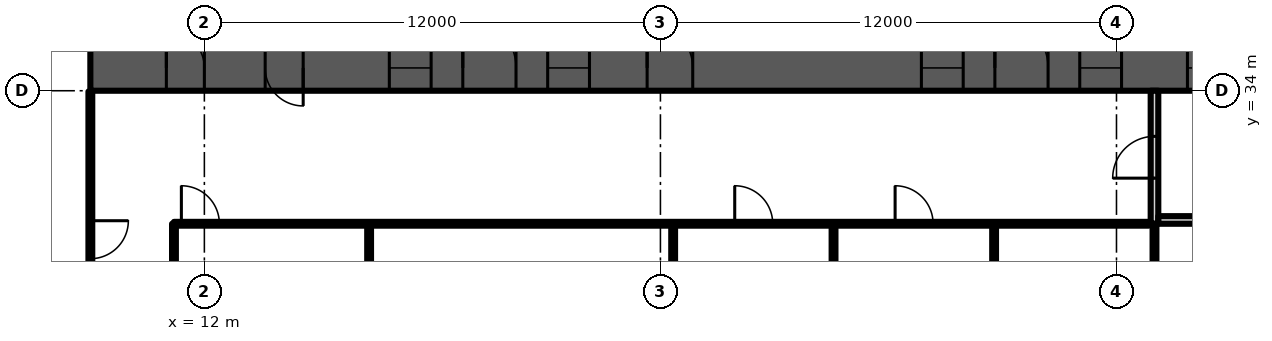
"""IFC4 building model, lengths in metres.
Left out: names, types, materials, properties, quantities, classifications, styles, units other than length and angle.
Written with IfcOpenShell. Run it as: python <this file> out.ifc"""

import sys

from ifc_helpers import new_model, si_unit, direction, frame, frame_2d, origin, place, context, subcontext, project, spatial, rectangle, extrude, element, fill, save


model = new_model("IFC4")
c1 = context("Model", 3, precision=1e-05, world=origin(), true_north=direction((0.0, 1.0)))
c2 = subcontext(c1, "Body", "Model", "MODEL_VIEW")
j1 = project(units=[si_unit("LENGTHUNIT", "METRE"), si_unit("PLANEANGLEUNIT", "RADIAN")], contexts=[c1])
p1 = place(None, origin())
s1 = spatial("IfcSite", under=j1, at=p1, CompositionType="ELEMENT")
p2 = place(p1, origin())
s2 = spatial("IfcBuilding", under=s1, at=p2, CompositionType="ELEMENT")
p3 = place(p2, frame((0.0, 0.0, 52.3)))
s3 = spatial("IfcBuildingStorey", under=s2, at=p3, CompositionType="ELEMENT", Elevation=52.3)
p4 = place(p3, frame((9.0, 34.6, 0.0), z_axis=(0.0, 0.0, 1.0), x_axis=(1.0, 0.0, 0.0)))
e1 = element("IfcWall", 1, at=p4, inside=s3, PredefinedType="SHEAR", context=c2, shape_type="SweptSolid", body=[
    extrude(rectangle(XDim=56.0, YDim=1.2, at=frame_2d((28.0, 0.0))), origin(), (0.0, 0.0, 1.0), 3.6),
])
p5 = place(p4, frame((2.0, 0.0, 0.0)))
e2 = element("IfcOpeningElement", 2, at=p5, cuts=e1, PredefinedType="OPENING", context=c2, shape_type="SweptSolid", body=[
    extrude(rectangle(XDim=1.0, YDim=2.1, at=frame_2d((0.5, 1.05))), frame((0.0, 0.61, 0.0), z_axis=(0.0, -1.0, 0.0), x_axis=(1.0, 0.0, 0.0)), (0.0, 0.0, 1.0), 1.22),
])
p6 = place(p4, frame((4.6, 0.0, 0.0)))
e3 = element("IfcOpeningElement", 3, at=p6, cuts=e1, PredefinedType="OPENING", context=c2, shape_type="SweptSolid", body=[
    extrude(rectangle(XDim=1.0, YDim=2.1, at=frame_2d((0.5, 1.05))), frame((0.0, 0.61, 0.0), z_axis=(0.0, -1.0, 0.0), x_axis=(1.0, 0.0, 0.0)), (0.0, 0.0, 1.0), 1.22),
])
p7 = place(p4, frame((7.867, 0.0, 0.0)))
e4 = element("IfcOpeningElement", 4, at=p7, cuts=e1, PredefinedType="OPENING", context=c2, shape_type="SweptSolid", body=[
    extrude(rectangle(XDim=1.1, YDim=2.1, at=frame_2d((0.55, 1.05))), frame((0.0, 0.61, 0.0), z_axis=(0.0, -1.0, 0.0), x_axis=(1.0, 0.0, 0.0)), (0.0, 0.0, 1.0), 1.22),
])
p8 = place(p4, frame((12.033, 0.0, 0.0)))
e5 = element("IfcOpeningElement", 5, at=p8, cuts=e1, PredefinedType="OPENING", context=c2, shape_type="SweptSolid", body=[
    extrude(rectangle(XDim=1.1, YDim=2.1, at=frame_2d((0.55, 1.05))), frame((0.0, 0.61, 0.0), z_axis=(0.0, -1.0, 0.0), x_axis=(1.0, 0.0, 0.0)), (0.0, 0.0, 1.0), 1.22),
])
p9 = place(p4, frame((9.8, 0.0, 0.0)))
e6 = element("IfcOpeningElement", 6, at=p9, cuts=e1, PredefinedType="OPENING", context=c2, shape_type="SweptSolid", body=[
    extrude(rectangle(XDim=1.4, YDim=2.1, at=frame_2d((0.7, 1.05))), frame((0.0, 0.61, 0.0), z_axis=(0.0, -1.0, 0.0), x_axis=(1.0, 0.0, 0.0)), (0.0, 0.0, 1.0), 1.22),
])
p10 = place(p4, frame((14.65, 0.0, 0.0)))
e7 = element("IfcOpeningElement", 7, at=p10, cuts=e1, PredefinedType="OPENING", context=c2, shape_type="SweptSolid", body=[
    extrude(rectangle(XDim=1.2, YDim=2.1, at=frame_2d((0.6, 1.05))), frame((0.0, 0.61, 0.0), z_axis=(0.0, -1.0, 0.0), x_axis=(1.0, 0.0, 0.0)), (0.0, 0.0, 1.0), 1.22),
])
p11 = place(p4, frame((21.867, 0.0, 0.0)))
e8 = element("IfcOpeningElement", 8, at=p11, cuts=e1, PredefinedType="OPENING", context=c2, shape_type="SweptSolid", body=[
    extrude(rectangle(XDim=1.1, YDim=2.1, at=frame_2d((0.55, 1.05))), frame((0.0, 0.61, 0.0), z_axis=(0.0, -1.0, 0.0), x_axis=(1.0, 0.0, 0.0)), (0.0, 0.0, 1.0), 1.22),
])
p12 = place(p4, frame((26.033, 0.0, 0.0)))
e9 = element("IfcOpeningElement", 9, at=p12, cuts=e1, PredefinedType="OPENING", context=c2, shape_type="SweptSolid", body=[
    extrude(rectangle(XDim=1.1, YDim=2.1, at=frame_2d((0.55, 1.05))), frame((0.0, 0.61, 0.0), z_axis=(0.0, -1.0, 0.0), x_axis=(1.0, 0.0, 0.0)), (0.0, 0.0, 1.0), 1.22),
])
p13 = place(p4, frame((23.8, 0.0, 0.0)))
e10 = element("IfcOpeningElement", 10, at=p13, cuts=e1, PredefinedType="OPENING", context=c2, shape_type="SweptSolid", body=[
    extrude(rectangle(XDim=1.4, YDim=2.1, at=frame_2d((0.7, 1.05))), frame((0.0, 0.61, 0.0), z_axis=(0.0, -1.0, 0.0), x_axis=(1.0, 0.0, 0.0)), (0.0, 0.0, 1.0), 1.22),
])
p14 = place(p4, frame((28.867, 0.0, 0.0)))
e11 = element("IfcOpeningElement", 11, at=p14, cuts=e1, PredefinedType="OPENING", context=c2, shape_type="SweptSolid", body=[
    extrude(rectangle(XDim=1.1, YDim=2.1, at=frame_2d((0.55, 1.05))), frame((0.0, 0.61, 0.0), z_axis=(0.0, -1.0, 0.0), x_axis=(1.0, 0.0, 0.0)), (0.0, 0.0, 1.0), 1.22),
])
p15 = place(p4, frame((33.033, 0.0, 0.0)))
e12 = element("IfcOpeningElement", 12, at=p15, cuts=e1, PredefinedType="OPENING", context=c2, shape_type="SweptSolid", body=[
    extrude(rectangle(XDim=1.1, YDim=2.1, at=frame_2d((0.55, 1.05))), frame((0.0, 0.61, 0.0), z_axis=(0.0, -1.0, 0.0), x_axis=(1.0, 0.0, 0.0)), (0.0, 0.0, 1.0), 1.22),
])
p16 = place(p4, frame((40.15, 0.0, 0.0)))
e13 = element("IfcOpeningElement", 13, at=p16, cuts=e1, PredefinedType="OPENING", context=c2, shape_type="SweptSolid", body=[
    extrude(rectangle(XDim=1.2, YDim=2.1, at=frame_2d((0.6, 1.05))), frame((0.0, 0.61, 0.0), z_axis=(0.0, -1.0, 0.0), x_axis=(1.0, 0.0, 0.0)), (0.0, 0.0, 1.0), 1.22),
])
p17 = place(p4, frame((44.8, 0.0, 0.0)))
e14 = element("IfcOpeningElement", 14, at=p17, cuts=e1, PredefinedType="OPENING", context=c2, shape_type="SweptSolid", body=[
    extrude(rectangle(XDim=1.4, YDim=2.1, at=frame_2d((0.7, 1.05))), frame((0.0, 0.61, 0.0), z_axis=(0.0, -1.0, 0.0), x_axis=(1.0, 0.0, 0.0)), (0.0, 0.0, 1.0), 1.22),
])
p18 = place(p4, frame((49.867, 0.0, 0.0)))
e15 = element("IfcOpeningElement", 15, at=p18, cuts=e1, PredefinedType="OPENING", context=c2, shape_type="SweptSolid", body=[
    extrude(rectangle(XDim=1.1, YDim=2.1, at=frame_2d((0.55, 1.05))), frame((0.0, 0.61, 0.0), z_axis=(0.0, -1.0, 0.0), x_axis=(1.0, 0.0, 0.0)), (0.0, 0.0, 1.0), 1.22),
])
p19 = place(p4, frame((53.5, 0.0, 0.0)))
e16 = element("IfcOpeningElement", 16, at=p19, cuts=e1, PredefinedType="OPENING", context=c2, shape_type="SweptSolid", body=[
    extrude(rectangle(XDim=1.1, YDim=2.1, at=frame_2d((0.55, 1.05))), frame((0.0, 0.61, 0.0), z_axis=(0.0, -1.0, 0.0), x_axis=(1.0, 0.0, 0.0)), (0.0, 0.0, 1.0), 1.22),
])
p20 = place(p4, frame((51.567, 0.0, 0.0)))
e17 = element("IfcOpeningElement", 17, at=p20, cuts=e1, PredefinedType="OPENING", context=c2, shape_type="SweptSolid", body=[
    extrude(rectangle(XDim=1.4, YDim=2.1, at=frame_2d((0.7, 1.05))), frame((0.0, 0.61, 0.0), z_axis=(0.0, -1.0, 0.0), x_axis=(1.0, 0.0, 0.0)), (0.0, 0.0, 1.0), 1.22),
])
p21 = place(p3, frame((37.0, 30.5, 0.0), z_axis=(0.0, 0.0, 1.0), x_axis=(0.0, 1.0, 0.0)))
e18 = element("IfcWall", 18, at=p21, inside=s3, PredefinedType="PARTITIONING", context=c2, shape_type="SweptSolid", body=[
    extrude(rectangle(XDim=3.5, YDim=0.2, at=frame_2d((1.75, 0.0))), origin(), (0.0, 0.0, 1.0), 3.2),
])
p22 = place(p21, frame((1.2, 0.0, 0.0)))
e19 = element("IfcOpeningElement", 19, at=p22, cuts=e18, PredefinedType="OPENING", context=c2, shape_type="SweptSolid", body=[
    extrude(rectangle(XDim=1.1, YDim=2.1, at=frame_2d((0.55, 1.05))), frame((0.0, 0.11, 0.0), z_axis=(0.0, -1.0, 0.0), x_axis=(1.0, 0.0, 0.0)), (0.0, 0.0, 1.0), 0.22),
])
p23 = place(p3, frame((37.1, 30.6, 0.0), z_axis=(0.0, 0.0, 1.0), x_axis=(1.0, 0.0, 0.0)))
e20 = element("IfcWall", 20, at=p23, inside=s3, PredefinedType="PARTITIONING", context=c2, shape_type="SweptSolid", body=[
    extrude(rectangle(XDim=2.8, YDim=0.2, at=frame_2d((1.4, 0.0))), origin(), (0.0, 0.0, 1.0), 3.2),
])
p24 = place(p3, frame((9.0, 26.05, 0.0), z_axis=(0.0, 0.0, 1.0), x_axis=(0.0, 1.0, 0.0)))
e21 = element("IfcWall", 21, at=p24, inside=s3, PredefinedType="PARTITIONING", context=c2, shape_type="SweptSolid", body=[
    extrude(rectangle(XDim=7.93, YDim=0.1, at=frame_2d((3.965, 0.0))), origin(), (0.0, 0.0, 1.0), 3.2),
])
p25 = place(p24, frame((3.53, 0.0, 0.0)))
e22 = element("IfcOpeningElement", 22, at=p25, cuts=e21, PredefinedType="OPENING", context=c2, shape_type="SweptSolid", body=[
    extrude(rectangle(XDim=1.0, YDim=2.1, at=frame_2d((0.5, 1.05))), frame((0.0, 0.06, 0.0), z_axis=(0.0, -1.0, 0.0), x_axis=(1.0, 0.0, 0.0)), (0.0, 0.0, 1.0), 0.12),
])
p26 = place(p3, frame((11.2, 23.515, 0.0), z_axis=(0.0, 0.0, 1.0), x_axis=(0.0, 1.0, 0.0)))
e23 = element("IfcWall", 23, at=p26, inside=s3, PredefinedType="PARTITIONING", context=c2, shape_type="SweptSolid", body=[
    extrude(rectangle(XDim=6.985, YDim=0.1, at=frame_2d((3.493, 0.0))), origin(), (0.0, 0.0, 1.0), 3.2),
])
p27 = place(p3, frame((11.2, 30.5, 0.0), z_axis=(0.0, 0.0, 1.0), x_axis=(1.0, 0.0, 0.0)))
e24 = element("IfcWall", 24, at=p27, inside=s3, PredefinedType="PARTITIONING", context=c2, shape_type="SweptSolid", body=[
    extrude(rectangle(XDim=25.65, YDim=0.1, at=frame_2d((12.825, 0.0))), origin(), (0.0, 0.0, 1.0), 3.2),
])
p28 = place(p27, frame((0.195, 0.0, 0.0)))
e25 = element("IfcOpeningElement", 25, at=p28, cuts=e24, PredefinedType="OPENING", context=c2, shape_type="SweptSolid", body=[
    extrude(rectangle(XDim=1.0, YDim=2.1, at=frame_2d((0.5, 1.05))), frame((0.0, 0.06, 0.0), z_axis=(0.0, -1.0, 0.0), x_axis=(1.0, 0.0, 0.0)), (0.0, 0.0, 1.0), 0.12),
])
p29 = place(p27, frame((14.755, 0.0, 0.0)))
e26 = element("IfcOpeningElement", 26, at=p29, cuts=e24, PredefinedType="OPENING", context=c2, shape_type="SweptSolid", body=[
    extrude(rectangle(XDim=1.0, YDim=2.1, at=frame_2d((0.5, 1.05))), frame((0.0, 0.06, 0.0), z_axis=(0.0, -1.0, 0.0), x_axis=(1.0, 0.0, 0.0)), (0.0, 0.0, 1.0), 0.12),
])
p30 = place(p27, frame((18.975, 0.0, 0.0)))
e27 = element("IfcOpeningElement", 27, at=p30, cuts=e24, PredefinedType="OPENING", context=c2, shape_type="SweptSolid", body=[
    extrude(rectangle(XDim=1.0, YDim=2.1, at=frame_2d((0.5, 1.05))), frame((0.0, 0.06, 0.0), z_axis=(0.0, -1.0, 0.0), x_axis=(1.0, 0.0, 0.0)), (0.0, 0.0, 1.0), 0.12),
])
for number, where, z_axis, x_axis in (
    (28, (16.335, 20.445, 0.0), (0.0, 0.0, 1.0), (0.0, 1.0, 0.0)),
    (29, (24.335, 20.445, 0.0), (0.0, 0.0, 1.0), (0.0, 1.0, 0.0)),
    (30, (28.555, 20.445, 0.0), (0.0, 0.0, 1.0), (0.0, 1.0, 0.0)),
    (31, (32.78, 20.445, 0.0), (0.0, 0.0, 1.0), (0.0, 1.0, 0.0)),
    (32, (37.0, 20.445, 0.0), (0.0, 0.0, 1.0), (0.0, 1.0, 0.0)),
):
    element("IfcWall", number, at=place(p3, frame(where, z_axis=z_axis, x_axis=x_axis)), inside=s3, PredefinedType="PARTITIONING", context=c2, shape_type="SweptSolid", body=[
        extrude(rectangle(XDim=10.055, YDim=0.1, at=frame_2d((5.027, 0.0))), origin(), (0.0, 0.0, 1.0), 3.2),
    ])
p31 = place(p5, origin())
e33 = element("IfcDoor", 33, at=p31, inside=s3, OperationType="SINGLE_SWING_LEFT", PredefinedType="DOOR", context=c2, shape_type="SweptSolid", body=[
    extrude(rectangle(XDim=1.0, YDim=2.1, at=frame_2d((0.5, 1.05))), frame((0.0, 0.6, 0.0), z_axis=(0.0, -1.0, 0.0), x_axis=(1.0, 0.0, 0.0)), (0.0, 0.0, 1.0), 1.199),
])
fill(e2, e33)
p32 = place(p6, origin())
e34 = element("IfcDoor", 34, at=p32, inside=s3, OperationType="SINGLE_SWING_RIGHT", PredefinedType="DOOR", context=c2, shape_type="SweptSolid", body=[
    extrude(rectangle(XDim=1.0, YDim=2.1, at=frame_2d((0.5, 1.05))), frame((0.0, 0.6, 0.0), z_axis=(0.0, -1.0, 0.0), x_axis=(1.0, 0.0, 0.0)), (0.0, 0.0, 1.0), 1.199),
])
fill(e3, e34)
p33 = place(p7, origin())
e35 = element("IfcDoor", 35, at=p33, inside=s3, OperationType="DOUBLE_DOOR_SLIDING", PredefinedType="DOOR", context=c2, shape_type="SweptSolid", body=[
    extrude(rectangle(XDim=1.1, YDim=2.1, at=frame_2d((0.55, 1.05))), frame((0.0, 0.025, 0.0), z_axis=(0.0, -1.0, 0.0), x_axis=(1.0, 0.0, 0.0)), (0.0, 0.0, 1.0), 0.05),
])
fill(e4, e35)
p34 = place(p8, origin())
e36 = element("IfcDoor", 36, at=p34, inside=s3, OperationType="DOUBLE_DOOR_SLIDING", PredefinedType="DOOR", context=c2, shape_type="SweptSolid", body=[
    extrude(rectangle(XDim=1.1, YDim=2.1, at=frame_2d((0.55, 1.05))), frame((0.0, 0.025, 0.0), z_axis=(0.0, -1.0, 0.0), x_axis=(1.0, 0.0, 0.0)), (0.0, 0.0, 1.0), 0.05),
])
fill(e5, e36)
p35 = place(p9, origin())
e37 = element("IfcDoor", 37, at=p35, inside=s3, OperationType="DOUBLE_DOOR_SINGLE_SWING", PredefinedType="DOOR", context=c2, shape_type="SweptSolid", body=[
    extrude(rectangle(XDim=1.4, YDim=2.1, at=frame_2d((0.7, 1.05))), frame((0.0, 0.025, 0.0), z_axis=(0.0, -1.0, 0.0), x_axis=(1.0, 0.0, 0.0)), (0.0, 0.0, 1.0), 0.05),
])
fill(e6, e37)
p36 = place(p10, origin())
e38 = element("IfcDoor", 38, at=p36, inside=s3, OperationType="SINGLE_SWING_LEFT", PredefinedType="DOOR", context=c2, shape_type="SweptSolid", body=[
    extrude(rectangle(XDim=1.2, YDim=2.1, at=frame_2d((0.6, 1.05))), frame((0.0, 0.025, 0.0), z_axis=(0.0, -1.0, 0.0), x_axis=(1.0, 0.0, 0.0)), (0.0, 0.0, 1.0), 0.05),
])
fill(e7, e38)
p37 = place(p11, origin())
e39 = element("IfcDoor", 39, at=p37, inside=s3, OperationType="DOUBLE_DOOR_SLIDING", PredefinedType="DOOR", context=c2, shape_type="SweptSolid", body=[
    extrude(rectangle(XDim=1.1, YDim=2.1, at=frame_2d((0.55, 1.05))), frame((0.0, 0.025, 0.0), z_axis=(0.0, -1.0, 0.0), x_axis=(1.0, 0.0, 0.0)), (0.0, 0.0, 1.0), 0.05),
])
fill(e8, e39)
p38 = place(p12, origin())
e40 = element("IfcDoor", 40, at=p38, inside=s3, OperationType="DOUBLE_DOOR_SLIDING", PredefinedType="DOOR", context=c2, shape_type="SweptSolid", body=[
    extrude(rectangle(XDim=1.1, YDim=2.1, at=frame_2d((0.55, 1.05))), frame((0.0, 0.025, 0.0), z_axis=(0.0, -1.0, 0.0), x_axis=(1.0, 0.0, 0.0)), (0.0, 0.0, 1.0), 0.05),
])
fill(e9, e40)
p39 = place(p13, origin())
e41 = element("IfcDoor", 41, at=p39, inside=s3, OperationType="DOUBLE_DOOR_SINGLE_SWING", PredefinedType="DOOR", context=c2, shape_type="SweptSolid", body=[
    extrude(rectangle(XDim=1.4, YDim=2.1, at=frame_2d((0.7, 1.05))), frame((0.0, 0.025, 0.0), z_axis=(0.0, -1.0, 0.0), x_axis=(1.0, 0.0, 0.0)), (0.0, 0.0, 1.0), 0.05),
])
fill(e10, e41)
p40 = place(p14, origin())
e42 = element("IfcDoor", 42, at=p40, inside=s3, OperationType="DOUBLE_DOOR_SLIDING", PredefinedType="DOOR", context=c2, shape_type="SweptSolid", body=[
    extrude(rectangle(XDim=1.1, YDim=2.1, at=frame_2d((0.55, 1.05))), frame((0.0, 0.025, 0.0), z_axis=(0.0, -1.0, 0.0), x_axis=(1.0, 0.0, 0.0)), (0.0, 0.0, 1.0), 0.05),
])
fill(e11, e42)
p41 = place(p22, origin())
e43 = element("IfcDoor", 43, at=p41, inside=s3, OperationType="SINGLE_SWING_LEFT", PredefinedType="DOOR", context=c2, shape_type="SweptSolid", body=[
    extrude(rectangle(XDim=1.1, YDim=2.1, at=frame_2d((0.55, 1.05))), frame((0.0, 0.025, 0.0), z_axis=(0.0, -1.0, 0.0), x_axis=(1.0, 0.0, 0.0)), (0.0, 0.0, 1.0), 0.05),
])
fill(e19, e43)
p42 = place(p25, origin())
e44 = element("IfcDoor", 44, at=p42, inside=s3, OperationType="SINGLE_SWING_RIGHT", PredefinedType="DOOR", context=c2, shape_type="SweptSolid", body=[
    extrude(rectangle(XDim=1.0, YDim=2.1, at=frame_2d((0.5, 1.05))), frame((0.0, 0.025, 0.0), z_axis=(0.0, -1.0, 0.0), x_axis=(1.0, 0.0, 0.0)), (0.0, 0.0, 1.0), 0.05),
])
fill(e22, e44)
p43 = place(p28, origin())
e45 = element("IfcDoor", 45, at=p43, inside=s3, OperationType="SINGLE_SWING_LEFT", PredefinedType="DOOR", context=c2, shape_type="SweptSolid", body=[
    extrude(rectangle(XDim=1.0, YDim=2.1, at=frame_2d((0.5, 1.05))), frame((0.0, 0.025, 0.0), z_axis=(0.0, -1.0, 0.0), x_axis=(1.0, 0.0, 0.0)), (0.0, 0.0, 1.0), 0.05),
])
fill(e25, e45)
p44 = place(p29, origin())
e46 = element("IfcDoor", 46, at=p44, inside=s3, OperationType="SINGLE_SWING_LEFT", PredefinedType="DOOR", context=c2, shape_type="SweptSolid", body=[
    extrude(rectangle(XDim=1.0, YDim=2.1, at=frame_2d((0.5, 1.05))), frame((0.0, 0.025, 0.0), z_axis=(0.0, -1.0, 0.0), x_axis=(1.0, 0.0, 0.0)), (0.0, 0.0, 1.0), 0.05),
])
fill(e26, e46)
p45 = place(p30, origin())
e47 = element("IfcDoor", 47, at=p45, inside=s3, OperationType="SINGLE_SWING_LEFT", PredefinedType="DOOR", context=c2, shape_type="SweptSolid", body=[
    extrude(rectangle(XDim=1.0, YDim=2.1, at=frame_2d((0.5, 1.05))), frame((0.0, 0.025, 0.0), z_axis=(0.0, -1.0, 0.0), x_axis=(1.0, 0.0, 0.0)), (0.0, 0.0, 1.0), 0.05),
])
fill(e27, e47)
save(model, sys.argv[1])
